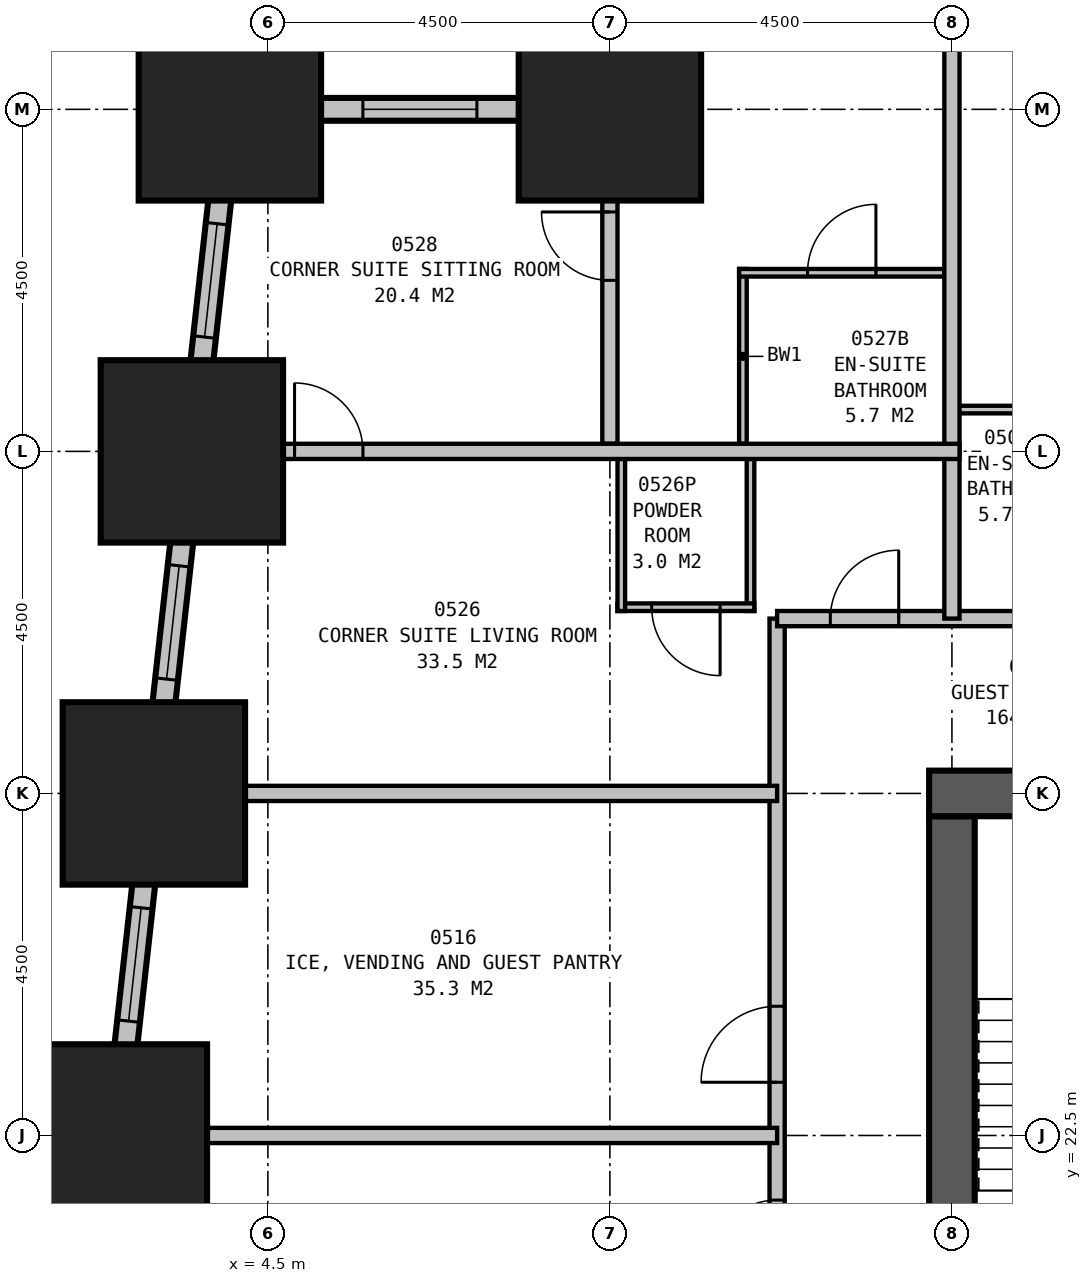
"""IFC4 building model, lengths in metres.
Left out: names, types, materials, properties, quantities, classifications, styles, units other than length and angle.
Written with IfcOpenShell. Run it as: python <this file> out.ifc"""

import sys

from ifc_helpers import new_model, si_unit, direction, frame, frame_2d, origin, origin_2d, place, context, subcontext, project, spatial, rectangle, extrude, element, fill, save


model = new_model("IFC4")
c1 = context("Model", 3, precision=1e-05, world=origin(), true_north=direction((0.0, 1.0)))
c2 = subcontext(c1, "Body", "Model", "MODEL_VIEW")
j1 = project(units=[si_unit("LENGTHUNIT", "METRE"), si_unit("PLANEANGLEUNIT", "RADIAN")], contexts=[c1])
p1 = place(None, origin())
s1 = spatial("IfcSite", under=j1, at=p1, CompositionType="ELEMENT")
p2 = place(p1, origin())
s2 = spatial("IfcBuilding", under=s1, at=p2, CompositionType="ELEMENT")
p3 = place(p2, frame((0.0, 0.0, 29.7)))
s3 = spatial("IfcBuildingStorey", under=s2, at=p3, CompositionType="ELEMENT", Elevation=29.7)
for number, where, z_axis, x_axis in (
    (1, (9.0, 36.0, 0.0), (0.0, 0.0, 1.0), (1.0, 0.0, 0.0)),
    (2, (4.0, 36.0, 0.0), (0.0, 0.0, 1.0), (1.0, 0.0, 0.0)),
    (3, (3.5, 31.5, 0.0), (0.0, 0.0, 1.0), (1.0, 0.0, 0.0)),
    (4, (3.0, 27.0, 0.0), (0.0, 0.0, 1.0), (1.0, 0.0, 0.0)),
    (5, (2.5, 22.5, 0.0), (0.0, 0.0, 1.0), (1.0, 0.0, 0.0)),
):
    element("IfcColumn", number, at=place(p3, frame(where, z_axis=z_axis, x_axis=x_axis)), inside=s3, PredefinedType="COLUMN", context=c2, shape_type="SweptSolid", body=[
        extrude(rectangle(XDim=2.4, YDim=2.4, at=origin_2d()), origin(), (0.0, 0.0, 1.0), 3.5),
    ])
p4 = place(p3, frame((36.3, 27.0, 0.0), z_axis=(0.0, 0.0, 1.0), x_axis=(-1.0, 0.0, 0.0)))
e6 = element("IfcWall", 6, at=p4, inside=s3, PredefinedType="SHEAR", context=c2, shape_type="SweptSolid", body=[
    extrude(rectangle(XDim=23.1, YDim=0.6, at=frame_2d((11.55, 0.0))), origin(), (0.0, 0.0, 1.0), 3.5),
])
p5 = place(p4, frame((17.05, 0.0, 0.0)))
e7 = element("IfcOpeningElement", 7, at=p5, cuts=e6, PredefinedType="OPENING", context=c2, shape_type="SweptSolid", body=[
    extrude(rectangle(XDim=1.0, YDim=2.1, at=frame_2d((0.5, 1.05))), frame((0.0, 0.31, 0.0), z_axis=(0.0, -1.0, 0.0), x_axis=(1.0, 0.0, 0.0)), (0.0, 0.0, 1.0), 0.62),
])
p6 = place(p4, frame((12.05, 0.0, 0.0)))
e8 = element("IfcOpeningElement", 8, at=p6, cuts=e6, PredefinedType="OPENING", context=c2, shape_type="SweptSolid", body=[
    extrude(rectangle(XDim=1.0, YDim=2.1, at=frame_2d((0.5, 1.05))), frame((0.0, 0.31, 0.0), z_axis=(0.0, -1.0, 0.0), x_axis=(1.0, 0.0, 0.0)), (0.0, 0.0, 1.0), 0.62),
])
p7 = place(p4, frame((7.05, 0.0, 0.0)))
e9 = element("IfcOpeningElement", 9, at=p7, cuts=e6, PredefinedType="OPENING", context=c2, shape_type="SweptSolid", body=[
    extrude(rectangle(XDim=1.0, YDim=2.1, at=frame_2d((0.5, 1.05))), frame((0.0, 0.31, 0.0), z_axis=(0.0, -1.0, 0.0), x_axis=(1.0, 0.0, 0.0)), (0.0, 0.0, 1.0), 0.62),
])
p8 = place(p3, frame((13.5, 26.7, 0.0), z_axis=(0.0, 0.0, 1.0), x_axis=(0.0, -1.0, 0.0)))
e10 = element("IfcWall", 10, at=p8, inside=s3, PredefinedType="SHEAR", context=c2, shape_type="SweptSolid", body=[
    extrude(rectangle(XDim=6.7, YDim=0.6, at=frame_2d((3.35, 0.0))), origin(), (0.0, 0.0, 1.0), 3.5),
])
p9 = place(p3, frame((9.0, 40.65, 0.0), z_axis=(0.0, 0.0, 1.0), x_axis=(0.0, -1.0, 0.0)))
e11 = element("IfcWall", 11, at=p9, inside=s3, PredefinedType="STANDARD", context=c2, shape_type="SweptSolid", body=[
    extrude(rectangle(XDim=4.8, YDim=0.3, at=frame_2d((2.4, 0.0))), origin(), (0.0, 0.0, 1.0), 2.05),
])
p10 = place(p9, frame((1.65, 0.0, 0.5)))
e12 = element("IfcOpeningElement", 12, at=p10, cuts=e11, PredefinedType="OPENING", context=c2, shape_type="SweptSolid", body=[
    extrude(rectangle(XDim=1.5, YDim=1.4, at=frame_2d((0.75, 0.7))), frame((0.0, 0.16, 0.0), z_axis=(0.0, -1.0, 0.0), x_axis=(1.0, 0.0, 0.0)), (0.0, 0.0, 1.0), 0.32),
])
p11 = place(p3, frame((9.15, 36.0, 0.0), z_axis=(0.0, 0.0, 1.0), x_axis=(-1.0, 0.0, 0.0)))
e13 = element("IfcWall", 13, at=p11, inside=s3, PredefinedType="STANDARD", context=c2, shape_type="SweptSolid", body=[
    extrude(rectangle(XDim=5.3, YDim=0.3, at=frame_2d((2.65, 0.0))), origin(), (0.0, 0.0, 1.0), 2.05),
])
p12 = place(p11, frame((1.9, 0.0, 0.5)))
e14 = element("IfcOpeningElement", 14, at=p12, cuts=e13, PredefinedType="OPENING", context=c2, shape_type="SweptSolid", body=[
    extrude(rectangle(XDim=1.5, YDim=1.4, at=frame_2d((0.75, 0.7))), frame((0.0, 0.16, 0.0), z_axis=(0.0, -1.0, 0.0), x_axis=(1.0, 0.0, 0.0)), (0.0, 0.0, 1.0), 0.32),
])
p13 = place(p3, frame((4.017, 36.149, 0.0), z_axis=(0.0, 0.0, 1.0), x_axis=(-0.110433201132, -0.993883548555, 0.0)))
e15 = element("IfcWall", 15, at=p13, inside=s3, PredefinedType="STANDARD", context=c2, shape_type="SweptSolid", body=[
    extrude(rectangle(XDim=31.994, YDim=0.3, at=frame_2d((15.997, 0.0))), origin(), (0.0, 0.0, 1.0), 2.05),
])
p14 = place(p13, frame((1.664, 0.0, 0.5)))
e16 = element("IfcOpeningElement", 16, at=p14, cuts=e15, PredefinedType="OPENING", context=c2, shape_type="SweptSolid", body=[
    extrude(rectangle(XDim=1.5, YDim=1.4, at=frame_2d((0.75, 0.7))), frame((0.0, 0.16, 0.0), z_axis=(0.0, -1.0, 0.0), x_axis=(1.0, 0.0, 0.0)), (0.0, 0.0, 1.0), 0.32),
])
p15 = place(p13, frame((6.192, 0.0, 0.5)))
e17 = element("IfcOpeningElement", 17, at=p15, cuts=e15, PredefinedType="OPENING", context=c2, shape_type="SweptSolid", body=[
    extrude(rectangle(XDim=1.5, YDim=1.4, at=frame_2d((0.75, 0.7))), frame((0.0, 0.16, 0.0), z_axis=(0.0, -1.0, 0.0), x_axis=(1.0, 0.0, 0.0)), (0.0, 0.0, 1.0), 0.32),
])
p16 = place(p13, frame((10.719, 0.0, 0.5)))
e18 = element("IfcOpeningElement", 18, at=p16, cuts=e15, PredefinedType="OPENING", context=c2, shape_type="SweptSolid", body=[
    extrude(rectangle(XDim=1.5, YDim=1.4, at=frame_2d((0.75, 0.7))), frame((0.0, 0.16, 0.0), z_axis=(0.0, -1.0, 0.0), x_axis=(1.0, 0.0, 0.0)), (0.0, 0.0, 1.0), 0.32),
])
p17 = place(p13, frame((15.247, 0.0, 0.5)))
e19 = element("IfcOpeningElement", 19, at=p17, cuts=e15, PredefinedType="OPENING", context=c2, shape_type="SweptSolid", body=[
    extrude(rectangle(XDim=1.5, YDim=1.4, at=frame_2d((0.75, 0.7))), frame((0.0, 0.16, 0.0), z_axis=(0.0, -1.0, 0.0), x_axis=(1.0, 0.0, 0.0)), (0.0, 0.0, 1.0), 0.32),
])
p18 = place(p13, frame((19.775, 0.0, 0.5)))
e20 = element("IfcOpeningElement", 20, at=p18, cuts=e15, PredefinedType="OPENING", context=c2, shape_type="SweptSolid", body=[
    extrude(rectangle(XDim=1.5, YDim=1.4, at=frame_2d((0.75, 0.7))), frame((0.0, 0.16, 0.0), z_axis=(0.0, -1.0, 0.0), x_axis=(1.0, 0.0, 0.0)), (0.0, 0.0, 1.0), 0.32),
])
p19 = place(p13, frame((24.302, 0.0, 0.5)))
e21 = element("IfcOpeningElement", 21, at=p19, cuts=e15, PredefinedType="OPENING", context=c2, shape_type="SweptSolid", body=[
    extrude(rectangle(XDim=1.5, YDim=1.4, at=frame_2d((0.75, 0.7))), frame((0.0, 0.16, 0.0), z_axis=(0.0, -1.0, 0.0), x_axis=(1.0, 0.0, 0.0)), (0.0, 0.0, 1.0), 0.32),
])
p20 = place(p13, frame((28.83, 0.0, 0.5)))
e22 = element("IfcOpeningElement", 22, at=p20, cuts=e15, PredefinedType="OPENING", context=c2, shape_type="SweptSolid", body=[
    extrude(rectangle(XDim=1.5, YDim=1.4, at=frame_2d((0.75, 0.7))), frame((0.0, 0.16, 0.0), z_axis=(0.0, -1.0, 0.0), x_axis=(1.0, 0.0, 0.0)), (0.0, 0.0, 1.0), 0.32),
])
p21 = place(p3, frame((11.2, 29.3, 0.0), z_axis=(0.0, 0.0, 1.0), x_axis=(1.0, 0.0, 0.0)))
e23 = element("IfcWall", 23, at=p21, inside=s3, PredefinedType="PARTITIONING", context=c2, shape_type="SweptSolid", body=[
    extrude(rectangle(XDim=27.1, YDim=0.2, at=frame_2d((13.55, 0.0))), origin(), (0.0, 0.0, 1.0), 3.25),
])
p22 = place(p21, frame((5.05, 0.0, 0.0)))
e24 = element("IfcOpeningElement", 24, at=p22, cuts=e23, PredefinedType="OPENING", context=c2, shape_type="SweptSolid", body=[
    extrude(rectangle(XDim=0.9, YDim=2.1, at=frame_2d((0.45, 1.05))), frame((0.0, 0.11, 0.0), z_axis=(0.0, -1.0, 0.0), x_axis=(1.0, 0.0, 0.0)), (0.0, 0.0, 1.0), 0.22),
])
p23 = place(p21, frame((9.55, 0.0, 0.0)))
e25 = element("IfcOpeningElement", 25, at=p23, cuts=e23, PredefinedType="OPENING", context=c2, shape_type="SweptSolid", body=[
    extrude(rectangle(XDim=0.9, YDim=2.1, at=frame_2d((0.45, 1.05))), frame((0.0, 0.11, 0.0), z_axis=(0.0, -1.0, 0.0), x_axis=(1.0, 0.0, 0.0)), (0.0, 0.0, 1.0), 0.22),
])
p24 = place(p21, frame((14.05, 0.0, 0.0)))
e26 = element("IfcOpeningElement", 26, at=p24, cuts=e23, PredefinedType="OPENING", context=c2, shape_type="SweptSolid", body=[
    extrude(rectangle(XDim=0.9, YDim=2.1, at=frame_2d((0.45, 1.05))), frame((0.0, 0.11, 0.0), z_axis=(0.0, -1.0, 0.0), x_axis=(1.0, 0.0, 0.0)), (0.0, 0.0, 1.0), 0.22),
])
p25 = place(p21, frame((18.55, 0.0, 0.0)))
e27 = element("IfcOpeningElement", 27, at=p25, cuts=e23, PredefinedType="OPENING", context=c2, shape_type="SweptSolid", body=[
    extrude(rectangle(XDim=0.9, YDim=2.1, at=frame_2d((0.45, 1.05))), frame((0.0, 0.11, 0.0), z_axis=(0.0, -1.0, 0.0), x_axis=(1.0, 0.0, 0.0)), (0.0, 0.0, 1.0), 0.22),
])
p26 = place(p21, frame((23.05, 0.0, 0.0)))
e28 = element("IfcOpeningElement", 28, at=p26, cuts=e23, PredefinedType="OPENING", context=c2, shape_type="SweptSolid", body=[
    extrude(rectangle(XDim=0.9, YDim=2.1, at=frame_2d((0.45, 1.05))), frame((0.0, 0.11, 0.0), z_axis=(0.0, -1.0, 0.0), x_axis=(1.0, 0.0, 0.0)), (0.0, 0.0, 1.0), 0.22),
])
p27 = place(p21, frame((25.5, 0.0, 0.0)))
e29 = element("IfcOpeningElement", 29, at=p27, cuts=e23, PredefinedType="OPENING", context=c2, shape_type="SweptSolid", body=[
    extrude(rectangle(XDim=0.9, YDim=2.1, at=frame_2d((0.45, 1.05))), frame((0.0, 0.11, 0.0), z_axis=(0.0, -1.0, 0.0), x_axis=(1.0, 0.0, 0.0)), (0.0, 0.0, 1.0), 0.22),
])
p28 = place(p21, frame((0.7, 0.0, 0.0)))
e30 = element("IfcOpeningElement", 30, at=p28, cuts=e23, PredefinedType="OPENING", context=c2, shape_type="SweptSolid", body=[
    extrude(rectangle(XDim=0.9, YDim=2.1, at=frame_2d((0.45, 1.05))), frame((0.0, 0.11, 0.0), z_axis=(0.0, -1.0, 0.0), x_axis=(1.0, 0.0, 0.0)), (0.0, 0.0, 1.0), 0.22),
])
p29 = place(p3, frame((11.2, 11.2, 0.0), z_axis=(0.0, 0.0, 1.0), x_axis=(0.0, 1.0, 0.0)))
e31 = element("IfcWall", 31, at=p29, inside=s3, PredefinedType="PARTITIONING", context=c2, shape_type="SweptSolid", body=[
    extrude(rectangle(XDim=18.1, YDim=0.2, at=frame_2d((9.05, 0.0))), origin(), (0.0, 0.0, 1.0), 3.25),
])
p30 = place(p29, frame((5.05, 0.0, 0.0)))
e32 = element("IfcOpeningElement", 32, at=p30, cuts=e31, PredefinedType="OPENING", context=c2, shape_type="SweptSolid", body=[
    extrude(rectangle(XDim=0.9, YDim=2.1, at=frame_2d((0.45, 1.05))), frame((0.0, 0.11, 0.0), z_axis=(0.0, -1.0, 0.0), x_axis=(1.0, 0.0, 0.0)), (0.0, 0.0, 1.0), 0.22),
])
p31 = place(p29, frame((9.55, 0.0, 0.0)))
e33 = element("IfcOpeningElement", 33, at=p31, cuts=e31, PredefinedType="OPENING", context=c2, shape_type="SweptSolid", body=[
    extrude(rectangle(XDim=0.9, YDim=2.1, at=frame_2d((0.45, 1.05))), frame((0.0, 0.11, 0.0), z_axis=(0.0, -1.0, 0.0), x_axis=(1.0, 0.0, 0.0)), (0.0, 0.0, 1.0), 0.22),
])
p32 = place(p29, frame((12.0, 0.0, 0.0)))
e34 = element("IfcOpeningElement", 34, at=p32, cuts=e31, PredefinedType="OPENING", context=c2, shape_type="SweptSolid", body=[
    extrude(rectangle(XDim=1.0, YDim=2.1, at=frame_2d((0.5, 1.05))), frame((0.0, 0.11, 0.0), z_axis=(0.0, -1.0, 0.0), x_axis=(1.0, 0.0, 0.0)), (0.0, 0.0, 1.0), 0.22),
])
p33 = place(p3, frame((13.5, 32.05, 0.0), z_axis=(0.0, 0.0, 1.0), x_axis=(1.0, 0.0, 0.0)))
e35 = element("IfcWall", 35, at=p33, inside=s3, PredefinedType="PLUMBINGWALL", context=c2, shape_type="SweptSolid", body=[
    extrude(rectangle(XDim=2.4, YDim=0.1, at=frame_2d((1.2, 0.0))), origin(), (0.0, 0.0, 1.0), 3.25),
])
p34 = place(p3, frame((11.2, 22.5, 0.0), z_axis=(0.0, 0.0, 1.0), x_axis=(-1.0, 0.0, 0.0)))
e36 = element("IfcWall", 36, at=p34, inside=s3, PredefinedType="PARTITIONING", context=c2, shape_type="SweptSolid", body=[
    extrude(rectangle(XDim=8.699, YDim=0.2, at=frame_2d((4.35, 0.0))), origin(), (0.0, 0.0, 1.0), 2.25),
])
p35 = place(p3, frame((11.2, 27.0, 0.0), z_axis=(0.0, 0.0, 1.0), x_axis=(-1.0, 0.0, 0.0)))
e37 = element("IfcWall", 37, at=p35, inside=s3, PredefinedType="PARTITIONING", context=c2, shape_type="SweptSolid", body=[
    extrude(rectangle(XDim=7.977, YDim=0.2, at=frame_2d((3.988, 0.0))), origin(), (0.0, 0.0, 1.0), 1.95),
])
p36 = place(p3, frame((13.5, 29.3, 0.0), z_axis=(0.0, 0.0, 1.0), x_axis=(0.0, 1.0, 0.0)))
e38 = element("IfcWall", 38, at=p36, inside=s3, PredefinedType="PARTITIONING", context=c2, shape_type="SweptSolid", body=[
    extrude(rectangle(XDim=11.2, YDim=0.2, at=frame_2d((5.6, 0.0))), origin(), (0.0, 0.0, 1.0), 2.25),
])
p37 = place(p3, frame((13.6, 31.5, 0.0), z_axis=(0.0, 0.0, 1.0), x_axis=(-1.0, 0.0, 0.0)))
e39 = element("IfcWall", 39, at=p37, inside=s3, PredefinedType="PARTITIONING", context=c2, shape_type="SweptSolid", body=[
    extrude(rectangle(XDim=10.099, YDim=0.2, at=frame_2d((5.05, 0.0))), origin(), (0.0, 0.0, 1.0), 3.25),
])
p38 = place(p37, frame((8.749, 0.0, 0.0), z_axis=(0.0, 0.0, 1.0), x_axis=(-1.0, 0.0, 0.0)))
e40 = element("IfcOpeningElement", 40, at=p38, cuts=e39, PredefinedType="OPENING", context=c2, shape_type="SweptSolid", body=[
    extrude(rectangle(XDim=0.9, YDim=2.1, at=frame_2d((0.45, 1.05))), frame((0.0, 0.11, 0.0), z_axis=(0.0, -1.0, 0.0), x_axis=(1.0, 0.0, 0.0)), (0.0, 0.0, 1.0), 0.22),
])
p39 = place(p3, frame((9.15, 31.4, 0.0), z_axis=(0.0, 0.0, 1.0), x_axis=(0.0, -1.0, 0.0)))
e41 = element("IfcWall", 41, at=p39, inside=s3, PredefinedType="PLUMBINGWALL", context=c2, shape_type="SweptSolid", body=[
    extrude(rectangle(XDim=2.0, YDim=0.1, at=frame_2d((1.0, 0.0))), origin(), (0.0, 0.0, 1.0), 2.25),
])
p40 = place(p3, frame((10.85, 31.4, 0.0), z_axis=(0.0, 0.0, 1.0), x_axis=(0.0, -1.0, 0.0)))
e42 = element("IfcWall", 42, at=p40, inside=s3, PredefinedType="PLUMBINGWALL", context=c2, shape_type="SweptSolid", body=[
    extrude(rectangle(XDim=2.0, YDim=0.1, at=frame_2d((1.0, 0.0))), origin(), (0.0, 0.0, 1.0), 3.25),
])
p41 = place(p3, frame((10.9, 29.45, 0.0), z_axis=(0.0, 0.0, 1.0), x_axis=(-1.0, 0.0, 0.0)))
e43 = element("IfcWall", 43, at=p41, inside=s3, PredefinedType="PLUMBINGWALL", context=c2, shape_type="SweptSolid", body=[
    extrude(rectangle(XDim=1.8, YDim=0.1, at=frame_2d((0.9, 0.0))), origin(), (0.0, 0.0, 1.0), 3.25),
])
p42 = place(p41, frame((0.45, 0.0, 0.0)))
e44 = element("IfcOpeningElement", 44, at=p42, cuts=e43, PredefinedType="OPENING", context=c2, shape_type="SweptSolid", body=[
    extrude(rectangle(XDim=0.9, YDim=2.1, at=frame_2d((0.45, 1.05))), frame((0.0, 0.06, 0.0), z_axis=(0.0, -1.0, 0.0), x_axis=(1.0, 0.0, 0.0)), (0.0, 0.0, 1.0), 0.12),
])
p43 = place(p3, frame((9.0, 31.6, 0.0), z_axis=(0.0, 0.0, 1.0), x_axis=(0.0, 1.0, 0.0)))
e45 = element("IfcWall", 45, at=p43, inside=s3, PredefinedType="PARTITIONING", context=c2, shape_type="SweptSolid", body=[
    extrude(rectangle(XDim=4.4, YDim=0.2, at=frame_2d((2.2, 0.0))), origin(), (0.0, 0.0, 1.0), 2.25),
])
p44 = place(p43, frame((2.15, 0.0, 0.0)))
e46 = element("IfcOpeningElement", 46, at=p44, cuts=e45, PredefinedType="OPENING", context=c2, shape_type="SweptSolid", body=[
    extrude(rectangle(XDim=0.9, YDim=2.1, at=frame_2d((0.45, 1.05))), frame((0.0, 0.11, 0.0), z_axis=(0.0, -1.0, 0.0), x_axis=(1.0, 0.0, 0.0)), (0.0, 0.0, 1.0), 0.22),
])
p45 = place(p3, frame((10.75, 31.6, 0.0), z_axis=(0.0, 0.0, 1.0), x_axis=(0.0, 1.0, 0.0)))
e47 = element("IfcWall", 47, at=p45, inside=s3, PredefinedType="PLUMBINGWALL", context=c2, shape_type="SweptSolid", body=[
    extrude(rectangle(XDim=2.3, YDim=0.1, at=frame_2d((1.15, 0.0))), origin(), (0.0, 0.0, 1.0), 3.25),
])
p46 = place(p3, frame((13.4, 33.85, 0.0), z_axis=(0.0, 0.0, 1.0), x_axis=(-1.0, 0.0, 0.0)))
e48 = element("IfcWall", 48, at=p46, inside=s3, PredefinedType="PLUMBINGWALL", context=c2, shape_type="SweptSolid", body=[
    extrude(rectangle(XDim=2.7, YDim=0.1, at=frame_2d((1.35, 0.0))), origin(), (0.0, 0.0, 1.0), 3.25),
])
p47 = place(p46, frame((1.8, 0.0, 0.0), z_axis=(0.0, 0.0, 1.0), x_axis=(-1.0, 0.0, 0.0)))
e49 = element("IfcOpeningElement", 49, at=p47, cuts=e48, PredefinedType="OPENING", context=c2, shape_type="SweptSolid", body=[
    extrude(rectangle(XDim=0.9, YDim=2.1, at=frame_2d((0.45, 1.05))), frame((0.0, 0.06, 0.0), z_axis=(0.0, -1.0, 0.0), x_axis=(1.0, 0.0, 0.0)), (0.0, 0.0, 1.0), 0.12),
])
p48 = place(p12, origin())
e50 = element("IfcWindow", 50, at=p48, inside=s3, PartitioningType="SINGLE_PANEL", PredefinedType="WINDOW", context=c2, shape_type="SweptSolid", body=[
    extrude(rectangle(XDim=1.5, YDim=1.4, at=frame_2d((0.75, 0.7))), frame((0.0, 0.03, 0.0), z_axis=(0.0, -1.0, 0.0), x_axis=(1.0, 0.0, 0.0)), (0.0, 0.0, 1.0), 0.06),
])
fill(e14, e50)
p49 = place(p14, origin())
e51 = element("IfcWindow", 51, at=p49, inside=s3, PartitioningType="SINGLE_PANEL", PredefinedType="WINDOW", context=c2, shape_type="SweptSolid", body=[
    extrude(rectangle(XDim=1.5, YDim=1.4, at=frame_2d((0.75, 0.7))), frame((0.0, 0.03, 0.0), z_axis=(0.0, -1.0, 0.0), x_axis=(1.0, 0.0, 0.0)), (0.0, 0.0, 1.0), 0.06),
])
fill(e16, e51)
p50 = place(p15, origin())
e52 = element("IfcWindow", 52, at=p50, inside=s3, PartitioningType="SINGLE_PANEL", PredefinedType="WINDOW", context=c2, shape_type="SweptSolid", body=[
    extrude(rectangle(XDim=1.5, YDim=1.4, at=frame_2d((0.75, 0.7))), frame((0.0, 0.03, 0.0), z_axis=(0.0, -1.0, 0.0), x_axis=(1.0, 0.0, 0.0)), (0.0, 0.0, 1.0), 0.06),
])
fill(e17, e52)
p51 = place(p16, origin())
e53 = element("IfcWindow", 53, at=p51, inside=s3, PartitioningType="SINGLE_PANEL", PredefinedType="WINDOW", context=c2, shape_type="SweptSolid", body=[
    extrude(rectangle(XDim=1.5, YDim=1.4, at=frame_2d((0.75, 0.7))), frame((0.0, 0.03, 0.0), z_axis=(0.0, -1.0, 0.0), x_axis=(1.0, 0.0, 0.0)), (0.0, 0.0, 1.0), 0.06),
])
fill(e18, e53)
p52 = place(p28, origin())
e54 = element("IfcDoor", 54, at=p52, inside=s3, OperationType="SINGLE_SWING_RIGHT", PredefinedType="DOOR", context=c2, shape_type="SweptSolid", body=[
    extrude(rectangle(XDim=0.9, YDim=2.1, at=frame_2d((0.45, 1.05))), frame((0.0, 0.025, 0.0), z_axis=(0.0, -1.0, 0.0), x_axis=(1.0, 0.0, 0.0)), (0.0, 0.0, 1.0), 0.05),
])
fill(e30, e54)
p53 = place(p31, origin())
e55 = element("IfcDoor", 55, at=p53, inside=s3, OperationType="SINGLE_SWING_LEFT", PredefinedType="DOOR", context=c2, shape_type="SweptSolid", body=[
    extrude(rectangle(XDim=0.9, YDim=2.1, at=frame_2d((0.45, 1.05))), frame((0.0, 0.025, 0.0), z_axis=(0.0, -1.0, 0.0), x_axis=(1.0, 0.0, 0.0)), (0.0, 0.0, 1.0), 0.05),
])
fill(e33, e55)
p54 = place(p32, origin())
e56 = element("IfcDoor", 56, at=p54, inside=s3, OperationType="SINGLE_SWING_LEFT", PredefinedType="DOOR", context=c2, shape_type="SweptSolid", body=[
    extrude(rectangle(XDim=1.0, YDim=2.1, at=frame_2d((0.5, 1.05))), frame((0.0, 0.025, 0.0), z_axis=(0.0, -1.0, 0.0), x_axis=(1.0, 0.0, 0.0)), (0.0, 0.0, 1.0), 0.05),
])
fill(e34, e56)
p55 = place(p38, origin())
e57 = element("IfcDoor", 57, at=p55, inside=s3, OperationType="SINGLE_SWING_LEFT", PredefinedType="DOOR", context=c2, shape_type="SweptSolid", body=[
    extrude(rectangle(XDim=0.9, YDim=2.1, at=frame_2d((0.45, 1.05))), frame((0.0, 0.025, 0.0), z_axis=(0.0, -1.0, 0.0), x_axis=(1.0, 0.0, 0.0)), (0.0, 0.0, 1.0), 0.05),
])
fill(e40, e57)
p56 = place(p42, origin())
e58 = element("IfcDoor", 58, at=p56, inside=s3, OperationType="SINGLE_SWING_LEFT", PredefinedType="DOOR", context=c2, shape_type="SweptSolid", body=[
    extrude(rectangle(XDim=0.9, YDim=2.1, at=frame_2d((0.45, 1.05))), frame((0.0, 0.025, 0.0), z_axis=(0.0, -1.0, 0.0), x_axis=(1.0, 0.0, 0.0)), (0.0, 0.0, 1.0), 0.05),
])
fill(e44, e58)
p57 = place(p44, origin())
e59 = element("IfcDoor", 59, at=p57, inside=s3, OperationType="SINGLE_SWING_RIGHT", PredefinedType="DOOR", context=c2, shape_type="SweptSolid", body=[
    extrude(rectangle(XDim=0.9, YDim=2.1, at=frame_2d((0.45, 1.05))), frame((0.0, 0.025, 0.0), z_axis=(0.0, -1.0, 0.0), x_axis=(1.0, 0.0, 0.0)), (0.0, 0.0, 1.0), 0.05),
])
fill(e46, e59)
p58 = place(p47, origin())
e60 = element("IfcDoor", 60, at=p58, inside=s3, OperationType="SINGLE_SWING_RIGHT", PredefinedType="DOOR", context=c2, shape_type="SweptSolid", body=[
    extrude(rectangle(XDim=0.9, YDim=2.1, at=frame_2d((0.45, 1.05))), frame((0.0, 0.025, 0.0), z_axis=(0.0, -1.0, 0.0), x_axis=(1.0, 0.0, 0.0)), (0.0, 0.0, 1.0), 0.05),
])
fill(e49, e60)
save(model, sys.argv[1])
